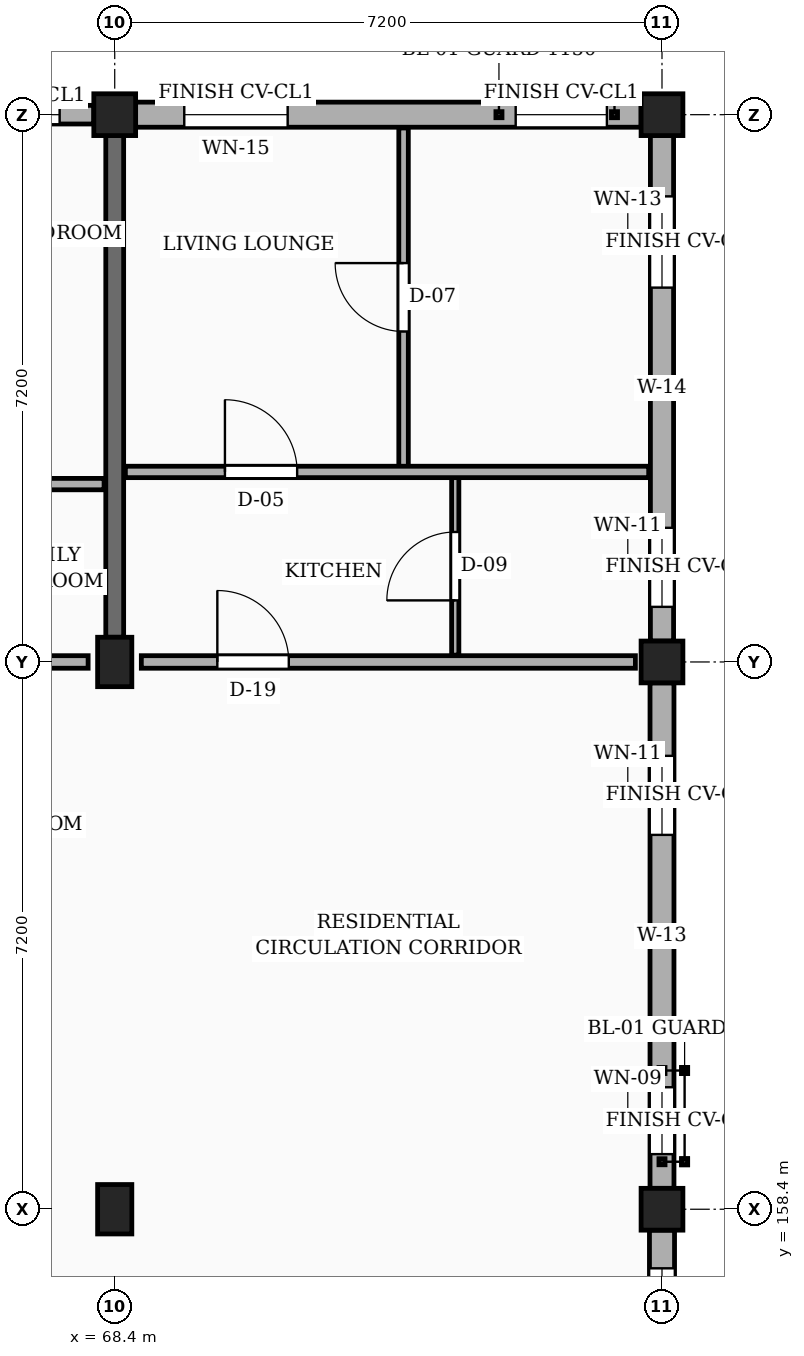
"""IFC4 building model, lengths in metres.
Left out: names, types, materials, properties, quantities, classifications, styles, units other than length and angle.
Written with IfcOpenShell. Run it as: python <this file> out.ifc"""

import sys

from ifc_helpers import new_model, si_unit, direction, frame, frame_2d, origin, origin_2d, place, context, subcontext, project, spatial, rectangle, extrude, element, fill, save


model = new_model("IFC4")
c1 = context("Model", 3, precision=1e-05, world=origin(), true_north=direction((0.0, 1.0)))
c2 = subcontext(c1, "Body", "Model", "MODEL_VIEW")
j1 = project(units=[si_unit("LENGTHUNIT", "METRE"), si_unit("PLANEANGLEUNIT", "RADIAN")], contexts=[c1])
p1 = place(None, origin())
s1 = spatial("IfcSite", under=j1, at=p1, CompositionType="ELEMENT")
p2 = place(p1, origin())
s2 = spatial("IfcBuilding", under=s1, at=p2, CompositionType="ELEMENT")
p3 = place(p2, frame((0.0, 0.0, 20.25)))
s3 = spatial("IfcBuildingStorey", under=s2, at=p3, CompositionType="ELEMENT", Elevation=20.25)
for number, where, z_axis, x_axis in (
    (1, (68.4, 158.4, 0.0), (0.0, 0.0, 1.0), (1.0, 0.0, 0.0)),
    (2, (68.4, 165.6, 0.0), (0.0, 0.0, 1.0), (1.0, 0.0, 0.0)),
):
    element("IfcColumn", number, at=place(p3, frame(where, z_axis=z_axis, x_axis=x_axis)), inside=s3, PredefinedType="COLUMN", context=c2, shape_type="SweptSolid", body=[
        extrude(rectangle(XDim=0.45, YDim=0.65, at=origin_2d()), origin(), (0.0, 0.0, 1.0), 3.15),
    ])
for number, where, z_axis, x_axis in (
    (3, (68.4, 172.8, 0.0), (0.0, 0.0, 1.0), (1.0, 0.0, 0.0)),
    (4, (75.6, 158.4, 0.0), (0.0, 0.0, 1.0), (1.0, 0.0, 0.0)),
    (5, (75.6, 165.6, 0.0), (0.0, 0.0, 1.0), (1.0, 0.0, 0.0)),
    (6, (75.6, 172.8, 0.0), (0.0, 0.0, 1.0), (1.0, 0.0, 0.0)),
):
    element("IfcColumn", number, at=place(p3, frame(where, z_axis=z_axis, x_axis=x_axis)), inside=s3, PredefinedType="COLUMN", context=c2, shape_type="SweptSolid", body=[
        extrude(rectangle(XDim=0.55, YDim=0.55, at=origin_2d()), origin(), (0.0, 0.0, 1.0), 3.15),
    ])
p4 = place(p3, frame((68.4, 165.925, 0.0), z_axis=(0.0, 0.0, 1.0), x_axis=(0.0, 1.0, 0.0)))
e7 = element("IfcWall", 7, at=p4, inside=s3, PredefinedType="SOLIDWALL", context=c2, shape_type="SweptSolid", body=[
    extrude(rectangle(XDim=6.6, YDim=0.235, at=frame_2d((3.3, 0.0))), origin(), (0.0, 0.0, 1.0), 2.185),
])
p5 = place(p3, frame((75.6, 151.475, 0.0), z_axis=(0.0, 0.0, 1.0), x_axis=(0.0, 1.0, 0.0)))
e8 = element("IfcWall", 8, at=p5, inside=s3, PredefinedType="SOLIDWALL", context=c2, shape_type="SweptSolid", body=[
    extrude(rectangle(XDim=6.65, YDim=0.33, at=frame_2d((3.325, 0.0))), origin(), (0.0, 0.0, 1.0), 2.455),
])
p6 = place(p5, frame((0.452, 0.0, 0.78)))
e9 = element("IfcOpeningElement", 9, at=p6, cuts=e8, PredefinedType="OPENING", context=c2, shape_type="SweptSolid", body=[
    extrude(rectangle(XDim=0.88, YDim=1.26, at=frame_2d((0.44, 0.63))), frame((0.0, 0.175, 0.0), z_axis=(0.0, -1.0, 0.0), x_axis=(1.0, 0.0, 0.0)), (0.0, 0.0, 1.0), 0.35),
])
p7 = place(p5, frame((2.535, 0.0, 0.78)))
e10 = element("IfcOpeningElement", 10, at=p7, cuts=e8, PredefinedType="OPENING", context=c2, shape_type="SweptSolid", body=[
    extrude(rectangle(XDim=1.4, YDim=1.15, at=frame_2d((0.7, 0.575))), frame((0.0, 0.175, 0.0), z_axis=(0.0, -1.0, 0.0), x_axis=(1.0, 0.0, 0.0)), (0.0, 0.0, 1.0), 0.35),
])
p8 = place(p5, frame((5.188, 0.0, 0.78)))
e11 = element("IfcOpeningElement", 11, at=p8, cuts=e8, PredefinedType="OPENING", context=c2, shape_type="SweptSolid", body=[
    extrude(rectangle(XDim=0.96, YDim=1.26, at=frame_2d((0.48, 0.63))), frame((0.0, 0.175, 0.0), z_axis=(0.0, -1.0, 0.0), x_axis=(1.0, 0.0, 0.0)), (0.0, 0.0, 1.0), 0.35),
])
p9 = place(p3, frame((75.6, 158.675, 0.0), z_axis=(0.0, 0.0, 1.0), x_axis=(0.0, 1.0, 0.0)))
e12 = element("IfcWall", 12, at=p9, inside=s3, PredefinedType="SOLIDWALL", context=c2, shape_type="SweptSolid", body=[
    extrude(rectangle(XDim=6.65, YDim=0.315, at=frame_2d((3.325, 0.0))), origin(), (0.0, 0.0, 1.0), 2.455),
])
p10 = place(p9, frame((0.45, 0.0, 0.78)))
e13 = element("IfcOpeningElement", 13, at=p10, cuts=e12, PredefinedType="OPENING", context=c2, shape_type="SweptSolid", body=[
    extrude(rectangle(XDim=0.88, YDim=1.26, at=frame_2d((0.44, 0.63))), frame((0.0, 0.167, 0.0), z_axis=(0.0, -1.0, 0.0), x_axis=(1.0, 0.0, 0.0)), (0.0, 0.0, 1.0), 0.335),
])
p11 = place(p9, frame((4.65, 0.0, 0.78)))
e14 = element("IfcOpeningElement", 14, at=p11, cuts=e12, PredefinedType="OPENING", context=c2, shape_type="SweptSolid", body=[
    extrude(rectangle(XDim=1.04, YDim=1.26, at=frame_2d((0.52, 0.63))), frame((0.0, 0.167, 0.0), z_axis=(0.0, -1.0, 0.0), x_axis=(1.0, 0.0, 0.0)), (0.0, 0.0, 1.0), 0.335),
])
p12 = place(p3, frame((75.6, 165.875, 0.0), z_axis=(0.0, 0.0, 1.0), x_axis=(0.0, 1.0, 0.0)))
e15 = element("IfcWall", 15, at=p12, inside=s3, PredefinedType="SOLIDWALL", context=c2, shape_type="SweptSolid", body=[
    extrude(rectangle(XDim=6.65, YDim=0.305, at=frame_2d((3.325, 0.0))), origin(), (0.0, 0.0, 1.0), 2.455),
])
p13 = place(p12, frame((0.45, 0.0, 0.78)))
e16 = element("IfcOpeningElement", 16, at=p13, cuts=e15, PredefinedType="OPENING", context=c2, shape_type="SweptSolid", body=[
    extrude(rectangle(XDim=1.04, YDim=1.26, at=frame_2d((0.52, 0.63))), frame((0.0, 0.163, 0.0), z_axis=(0.0, -1.0, 0.0), x_axis=(1.0, 0.0, 0.0)), (0.0, 0.0, 1.0), 0.325),
])
p14 = place(p12, frame((4.65, 0.0, 0.78)))
e17 = element("IfcOpeningElement", 17, at=p14, cuts=e15, PredefinedType="OPENING", context=c2, shape_type="SweptSolid", body=[
    extrude(rectangle(XDim=1.2, YDim=1.26, at=frame_2d((0.6, 0.63))), frame((0.0, 0.163, 0.0), z_axis=(0.0, -1.0, 0.0), x_axis=(1.0, 0.0, 0.0)), (0.0, 0.0, 1.0), 0.325),
])
p15 = place(p3, frame((75.325, 172.8, 0.0), z_axis=(0.0, 0.0, 1.0), x_axis=(-1.0, 0.0, 0.0)))
e18 = element("IfcWall", 18, at=p15, inside=s3, PredefinedType="SOLIDWALL", context=c2, shape_type="SweptSolid", body=[
    extrude(rectangle(XDim=6.65, YDim=0.33, at=frame_2d((3.325, 0.0))), origin(), (0.0, 0.0, 1.0), 2.455),
])
p16 = place(p15, frame((0.45, 0.0, 0.78)))
e19 = element("IfcOpeningElement", 19, at=p16, cuts=e18, PredefinedType="OPENING", context=c2, shape_type="SweptSolid", body=[
    extrude(rectangle(XDim=1.2, YDim=1.26, at=frame_2d((0.6, 0.63))), frame((0.0, 0.175, 0.0), z_axis=(0.0, -1.0, 0.0), x_axis=(1.0, 0.0, 0.0)), (0.0, 0.0, 1.0), 0.35),
])
p17 = place(p15, frame((4.65, 0.0, 0.78)))
e20 = element("IfcOpeningElement", 20, at=p17, cuts=e18, PredefinedType="OPENING", context=c2, shape_type="SweptSolid", body=[
    extrude(rectangle(XDim=1.36, YDim=1.26, at=frame_2d((0.68, 0.63))), frame((0.0, 0.175, 0.0), z_axis=(0.0, -1.0, 0.0), x_axis=(1.0, 0.0, 0.0)), (0.0, 0.0, 1.0), 0.35),
])
p18 = place(p3, frame((68.125, 172.8, 0.0), z_axis=(0.0, 0.0, 1.0), x_axis=(-1.0, 0.0, 0.0)))
e21 = element("IfcWall", 21, at=p18, inside=s3, PredefinedType="SOLIDWALL", context=c2, shape_type="SweptSolid", body=[
    extrude(rectangle(XDim=6.65, YDim=0.245, at=frame_2d((3.325, 0.0))), origin(), (0.0, 0.0, 1.0), 2.455),
])
p19 = place(p18, frame((0.45, 0.0, 0.78)))
e22 = element("IfcOpeningElement", 22, at=p19, cuts=e21, PredefinedType="OPENING", context=c2, shape_type="SweptSolid", body=[
    extrude(rectangle(XDim=1.36, YDim=1.26, at=frame_2d((0.68, 0.63))), frame((0.0, 0.133, 0.0), z_axis=(0.0, -1.0, 0.0), x_axis=(1.0, 0.0, 0.0)), (0.0, 0.0, 1.0), 0.265),
])
p20 = place(p18, frame((4.65, 0.0, 0.78)))
e23 = element("IfcOpeningElement", 23, at=p20, cuts=e21, PredefinedType="OPENING", context=c2, shape_type="SweptSolid", body=[
    extrude(rectangle(XDim=0.9, YDim=1.36, at=frame_2d((0.45, 0.68))), frame((0.0, 0.133, 0.0), z_axis=(0.0, -1.0, 0.0), x_axis=(1.0, 0.0, 0.0)), (0.0, 0.0, 1.0), 0.265),
])
p21 = place(p3, frame((61.55, 165.6, 0.0), z_axis=(0.0, 0.0, 1.0), x_axis=(1.0, 0.0, 0.0)))
e24 = element("IfcWall", 24, at=p21, inside=s3, PredefinedType="PARTITIONING", context=c2, shape_type="SweptSolid", body=[
    extrude(rectangle(XDim=6.5, YDim=0.165, at=frame_2d((3.25, 0.0))), origin(), (0.0, 0.0, 1.0), 2.32),
])
p22 = place(p21, frame((1.0, 0.0, 0.0)))
e25 = element("IfcOpeningElement", 25, at=p22, cuts=e24, PredefinedType="OPENING", context=c2, shape_type="SweptSolid", body=[
    extrude(rectangle(XDim=1.0, YDim=2.15, at=frame_2d((0.5, 1.075))), frame((0.0, 0.093, 0.0), z_axis=(0.0, -1.0, 0.0), x_axis=(1.0, 0.0, 0.0)), (0.0, 0.0, 1.0), 0.185),
])
p23 = place(p3, frame((68.75, 165.6, 0.0), z_axis=(0.0, 0.0, 1.0), x_axis=(1.0, 0.0, 0.0)))
e26 = element("IfcWall", 26, at=p23, inside=s3, PredefinedType="PARTITIONING", context=c2, shape_type="SweptSolid", body=[
    extrude(rectangle(XDim=6.5, YDim=0.165, at=frame_2d((3.25, 0.0))), origin(), (0.0, 0.0, 1.0), 2.32),
])
p24 = place(p23, frame((1.0, 0.0, 0.0)))
e27 = element("IfcOpeningElement", 27, at=p24, cuts=e26, PredefinedType="OPENING", context=c2, shape_type="SweptSolid", body=[
    extrude(rectangle(XDim=0.94, YDim=2.12, at=frame_2d((0.47, 1.06))), frame((0.0, 0.093, 0.0), z_axis=(0.0, -1.0, 0.0), x_axis=(1.0, 0.0, 0.0)), (0.0, 0.0, 1.0), 0.185),
])
p25 = place(p3, frame((61.34, 167.94, 0.0), z_axis=(0.0, 0.0, 1.0), x_axis=(1.0, 0.0, 0.0)))
e28 = element("IfcWall", 28, at=p25, inside=s3, PredefinedType="PARTITIONING", context=c2, shape_type="SweptSolid", body=[
    extrude(rectangle(XDim=6.92, YDim=0.15, at=frame_2d((3.46, 0.0))), origin(), (0.0, 0.0, 1.0), 2.32),
])
p26 = place(p25, frame((1.31, 0.0, 0.0)))
e29 = element("IfcOpeningElement", 29, at=p26, cuts=e28, PredefinedType="OPENING", context=c2, shape_type="SweptSolid", body=[
    extrude(rectangle(XDim=0.92, YDim=2.1, at=frame_2d((0.46, 1.05))), frame((0.0, 0.085, 0.0), z_axis=(0.0, -1.0, 0.0), x_axis=(1.0, 0.0, 0.0)), (0.0, 0.0, 1.0), 0.17),
])
p27 = place(p3, frame((72.2, 168.17, 0.0), z_axis=(0.0, 0.0, 1.0), x_axis=(0.0, 1.0, 0.0)))
e30 = element("IfcWall", 30, at=p27, inside=s3, PredefinedType="PARTITIONING", context=c2, shape_type="SweptSolid", body=[
    extrude(rectangle(XDim=4.455, YDim=0.125, at=frame_2d((2.228, 0.0))), origin(), (0.0, 0.0, 1.0), 2.32),
])
p28 = place(p27, frame((1.778, 0.0, 0.0)))
e31 = element("IfcOpeningElement", 31, at=p28, cuts=e30, PredefinedType="OPENING", context=c2, shape_type="SweptSolid", body=[
    extrude(rectangle(XDim=0.9, YDim=2.1, at=frame_2d((0.45, 1.05))), frame((0.0, 0.073, 0.0), z_axis=(0.0, -1.0, 0.0), x_axis=(1.0, 0.0, 0.0)), (0.0, 0.0, 1.0), 0.145),
])
p29 = place(p3, frame((72.88, 165.69, 0.0), z_axis=(0.0, 0.0, 1.0), x_axis=(0.0, 1.0, 0.0)))
e32 = element("IfcWall", 32, at=p29, inside=s3, PredefinedType="PARTITIONING", context=c2, shape_type="SweptSolid", body=[
    extrude(rectangle(XDim=2.34, YDim=0.095, at=frame_2d((1.17, 0.0))), origin(), (0.0, 0.0, 1.0), 2.32),
])
p30 = place(p29, frame((0.72, 0.0, 0.0)))
e33 = element("IfcOpeningElement", 33, at=p30, cuts=e32, PredefinedType="OPENING", context=c2, shape_type="SweptSolid", body=[
    extrude(rectangle(XDim=0.9, YDim=2.05, at=frame_2d((0.45, 1.025))), frame((0.0, 0.058, 0.0), z_axis=(0.0, -1.0, 0.0), x_axis=(1.0, 0.0, 0.0)), (0.0, 0.0, 1.0), 0.115),
])
p31 = place(p3, frame((68.54, 168.1, 0.0), z_axis=(0.0, 0.0, 1.0), x_axis=(1.0, 0.0, 0.0)))
e34 = element("IfcWall", 34, at=p31, inside=s3, PredefinedType="PARTITIONING", context=c2, shape_type="SweptSolid", body=[
    extrude(rectangle(XDim=6.885, YDim=0.15, at=frame_2d((3.442, 0.0))), origin(), (0.0, 0.0, 1.0), 2.32),
])
p32 = place(p31, frame((1.31, 0.0, 0.0)))
e35 = element("IfcOpeningElement", 35, at=p32, cuts=e34, PredefinedType="OPENING", context=c2, shape_type="SweptSolid", body=[
    extrude(rectangle(XDim=0.95, YDim=2.1, at=frame_2d((0.475, 1.05))), frame((0.0, 0.085, 0.0), z_axis=(0.0, -1.0, 0.0), x_axis=(1.0, 0.0, 0.0)), (0.0, 0.0, 1.0), 0.17),
])
p33 = place(p8, origin())
e36 = element("IfcWindow", 36, at=p33, inside=s3, PartitioningType="SINGLE_PANEL", PredefinedType="WINDOW", context=c2, shape_type="SweptSolid", body=[
    extrude(rectangle(XDim=0.96, YDim=1.26, at=frame_2d((0.48, 0.63))), frame((0.0, 0.03, 0.0), z_axis=(0.0, -1.0, 0.0), x_axis=(1.0, 0.0, 0.0)), (0.0, 0.0, 1.0), 0.06),
])
fill(e11, e36)
p34 = place(p10, origin())
e37 = element("IfcWindow", 37, at=p34, inside=s3, PartitioningType="SINGLE_PANEL", PredefinedType="WINDOW", context=c2, shape_type="SweptSolid", body=[
    extrude(rectangle(XDim=0.88, YDim=1.26, at=frame_2d((0.44, 0.63))), frame((0.0, 0.03, 0.0), z_axis=(0.0, -1.0, 0.0), x_axis=(1.0, 0.0, 0.0)), (0.0, 0.0, 1.0), 0.06),
])
fill(e13, e37)
p35 = place(p11, origin())
e38 = element("IfcWindow", 38, at=p35, inside=s3, PartitioningType="SINGLE_PANEL", PredefinedType="WINDOW", context=c2, shape_type="SweptSolid", body=[
    extrude(rectangle(XDim=1.04, YDim=1.26, at=frame_2d((0.52, 0.63))), frame((0.0, 0.03, 0.0), z_axis=(0.0, -1.0, 0.0), x_axis=(1.0, 0.0, 0.0)), (0.0, 0.0, 1.0), 0.06),
])
fill(e14, e38)
p36 = place(p13, origin())
e39 = element("IfcWindow", 39, at=p36, inside=s3, PartitioningType="SINGLE_PANEL", PredefinedType="WINDOW", context=c2, shape_type="SweptSolid", body=[
    extrude(rectangle(XDim=1.04, YDim=1.26, at=frame_2d((0.52, 0.63))), frame((0.0, 0.03, 0.0), z_axis=(0.0, -1.0, 0.0), x_axis=(1.0, 0.0, 0.0)), (0.0, 0.0, 1.0), 0.06),
])
fill(e16, e39)
p37 = place(p14, origin())
e40 = element("IfcWindow", 40, at=p37, inside=s3, PartitioningType="SINGLE_PANEL", PredefinedType="WINDOW", context=c2, shape_type="SweptSolid", body=[
    extrude(rectangle(XDim=1.2, YDim=1.26, at=frame_2d((0.6, 0.63))), frame((0.0, 0.03, 0.0), z_axis=(0.0, -1.0, 0.0), x_axis=(1.0, 0.0, 0.0)), (0.0, 0.0, 1.0), 0.06),
])
fill(e17, e40)
p38 = place(p16, origin())
e41 = element("IfcWindow", 41, at=p38, inside=s3, PartitioningType="SINGLE_PANEL", PredefinedType="WINDOW", context=c2, shape_type="SweptSolid", body=[
    extrude(rectangle(XDim=1.2, YDim=1.26, at=frame_2d((0.6, 0.63))), frame((0.0, 0.03, 0.0), z_axis=(0.0, -1.0, 0.0), x_axis=(1.0, 0.0, 0.0)), (0.0, 0.0, 1.0), 0.06),
])
fill(e19, e41)
p39 = place(p17, origin())
e42 = element("IfcWindow", 42, at=p39, inside=s3, PartitioningType="SINGLE_PANEL", PredefinedType="WINDOW", context=c2, shape_type="SweptSolid", body=[
    extrude(rectangle(XDim=1.36, YDim=1.26, at=frame_2d((0.68, 0.63))), frame((0.0, 0.03, 0.0), z_axis=(0.0, -1.0, 0.0), x_axis=(1.0, 0.0, 0.0)), (0.0, 0.0, 1.0), 0.06),
])
fill(e20, e42)
p40 = place(p19, origin())
e43 = element("IfcWindow", 43, at=p40, inside=s3, PartitioningType="SINGLE_PANEL", PredefinedType="WINDOW", context=c2, shape_type="SweptSolid", body=[
    extrude(rectangle(XDim=1.36, YDim=1.26, at=frame_2d((0.68, 0.63))), frame((0.0, 0.03, 0.0), z_axis=(0.0, -1.0, 0.0), x_axis=(1.0, 0.0, 0.0)), (0.0, 0.0, 1.0), 0.06),
])
fill(e22, e43)
p41 = place(p24, origin())
e44 = element("IfcDoor", 44, at=p41, inside=s3, OperationType="SINGLE_SWING_LEFT", PredefinedType="DOOR", context=c2, shape_type="SweptSolid", body=[
    extrude(rectangle(XDim=0.94, YDim=2.12, at=frame_2d((0.47, 1.06))), frame((0.0, 0.025, 0.0), z_axis=(0.0, -1.0, 0.0), x_axis=(1.0, 0.0, 0.0)), (0.0, 0.0, 1.0), 0.05),
])
fill(e27, e44)
p42 = place(p28, origin())
e45 = element("IfcDoor", 45, at=p42, inside=s3, OperationType="SINGLE_SWING_RIGHT", PredefinedType="DOOR", context=c2, shape_type="SweptSolid", body=[
    extrude(rectangle(XDim=0.9, YDim=2.1, at=frame_2d((0.45, 1.05))), frame((0.0, 0.025, 0.0), z_axis=(0.0, -1.0, 0.0), x_axis=(1.0, 0.0, 0.0)), (0.0, 0.0, 1.0), 0.05),
])
fill(e31, e45)
p43 = place(p30, origin())
e46 = element("IfcDoor", 46, at=p43, inside=s3, OperationType="SINGLE_SWING_LEFT", PredefinedType="DOOR", context=c2, shape_type="SweptSolid", body=[
    extrude(rectangle(XDim=0.9, YDim=2.05, at=frame_2d((0.45, 1.025))), frame((0.0, 0.025, 0.0), z_axis=(0.0, -1.0, 0.0), x_axis=(1.0, 0.0, 0.0)), (0.0, 0.0, 1.0), 0.05),
])
fill(e33, e46)
p44 = place(p32, origin())
e47 = element("IfcDoor", 47, at=p44, inside=s3, OperationType="SINGLE_SWING_LEFT", PredefinedType="DOOR", context=c2, shape_type="SweptSolid", body=[
    extrude(rectangle(XDim=0.95, YDim=2.1, at=frame_2d((0.475, 1.05))), frame((0.0, 0.025, 0.0), z_axis=(0.0, -1.0, 0.0), x_axis=(1.0, 0.0, 0.0)), (0.0, 0.0, 1.0), 0.05),
])
fill(e35, e47)
save(model, sys.argv[1])
